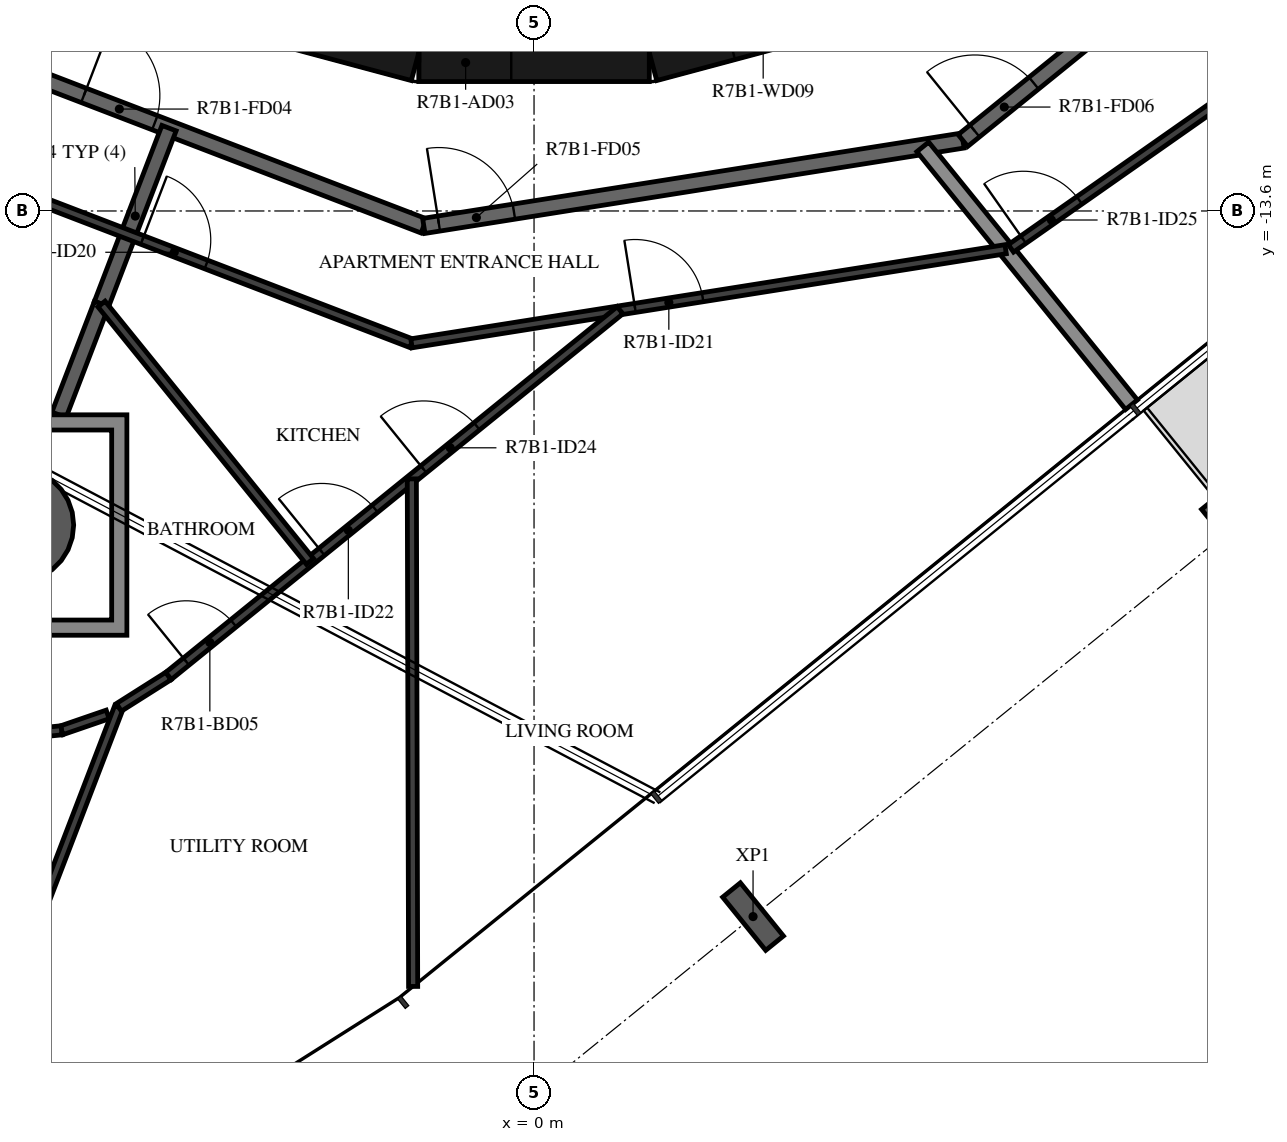
"""IFC4 building model, lengths in metres.
Left out: names, types, materials, properties, quantities, classifications, styles, units other than length and angle.
Written with IfcOpenShell. Run it as: python <this file> out.ifc"""

import sys

from ifc_helpers import new_model, si_unit, direction, frame, frame_2d, origin, origin_2d, place, context, subcontext, project, spatial, polyline, rectangle, hollow_circle, i_section, outline, extrude, element, fill, save


model = new_model("IFC4")
c1 = context("Model", 3, precision=1e-05, world=origin(), true_north=direction((0.0, 1.0)))
c2 = subcontext(c1, "Body", "Model", "MODEL_VIEW")
j1 = project(units=[si_unit("LENGTHUNIT", "METRE"), si_unit("PLANEANGLEUNIT", "RADIAN")], contexts=[c1])
p1 = place(None, origin())
s1 = spatial("IfcSite", under=j1, at=p1, CompositionType="ELEMENT")
p2 = place(p1, origin())
s2 = spatial("IfcBuilding", under=s1, at=p2, CompositionType="ELEMENT")
p3 = place(p2, frame((0.0, 0.0, 273.9)))
s3 = spatial("IfcBuildingStorey", under=s2, at=p3, CompositionType="ELEMENT", Elevation=273.9)
p4 = place(p3, frame((-6.807, -17.732, -0.38), z_axis=(0.0, 0.0, 1.0), x_axis=(1.0, 0.0, 0.0)))
e1 = element("IfcColumn", 1, at=p4, inside=s3, PredefinedType="COLUMN", context=c2, shape_type="SweptSolid", body=[
    extrude(hollow_circle(Radius=0.75, WallThickness=0.035, at=origin_2d()), origin(), (0.0, 0.0, 1.0), 3.5),
])
for number, where, z_axis, x_axis in (
    (2, (2.881, -22.883, -0.38), (0.0, 0.0, 1.0), (-0.777, -0.629, 0.0)),
    (3, (9.182, -17.781, -0.38), (0.0, 0.0, 1.0), (-0.777, -0.629, 0.0)),
):
    element("IfcColumn", number, at=place(p3, frame(where, z_axis=z_axis, x_axis=x_axis)), inside=s3, PredefinedType="COLUMN", context=c2, shape_type="SweptSolid", body=[
        extrude(i_section(OverallWidth=0.3, OverallDepth=0.9, WebThickness=0.019, FlangeThickness=0.035, FilletRadius=0.03, at=origin_2d()), origin(), (0.0, 0.0, 1.0), 3.5),
    ])
p5 = place(p3, frame((1.55, -11.643, 0.0), z_axis=(0.0, 0.0, 1.0), x_axis=(0.965948410781, 0.258734743916, 0.0)))
e4 = element("IfcWall", 4, at=p5, inside=s3, PredefinedType="SHEAR", context=c2, shape_type="SweptSolid", body=[
    extrude(rectangle(XDim=3.033, YDim=0.5, at=frame_2d((1.516, 0.0))), origin(), (0.0, 0.0, 1.0), 3.12),
])
p6 = place(p5, frame((1.066, 0.0, 0.0)))
e5 = element("IfcOpeningElement", 5, at=p6, cuts=e4, PredefinedType="OPENING", context=c2, shape_type="SweptSolid", body=[
    extrude(rectangle(XDim=0.9, YDim=2.1, at=frame_2d((0.45, 1.05))), frame((0.0, 0.26, 0.0), z_axis=(0.0, -1.0, 0.0), x_axis=(1.0, 0.0, 0.0)), (0.0, 0.0, 1.0), 0.52),
])
p7 = place(p3, frame((-4.479, -10.858, 0.0), z_axis=(0.0, 0.0, 1.0), x_axis=(0.965948410781, -0.258734743916, 0.0)))
e6 = element("IfcWall", 6, at=p7, inside=s3, PredefinedType="SHEAR", context=c2, shape_type="SweptSolid", body=[
    extrude(rectangle(XDim=3.033, YDim=0.5, at=frame_2d((1.516, 0.0))), origin(), (0.0, 0.0, 1.0), 3.12),
])
p8 = place(p3, frame((-1.516, -11.647, 0.0), z_axis=(0.0, 0.0, 1.0), x_axis=(1.0, 0.0, 0.0)))
e7 = element("IfcWall", 7, at=p8, inside=s3, PredefinedType="SHEAR", context=c2, shape_type="SweptSolid", body=[
    extrude(rectangle(XDim=3.033, YDim=0.5, at=frame_2d((1.516, 0.0))), origin(), (0.0, 0.0, 1.0), 3.12),
])
p9 = place(p8, frame((0.016, 0.0, 0.0)))
e8 = element("IfcOpeningElement", 8, at=p9, cuts=e7, PredefinedType="OPENING", context=c2, shape_type="SweptSolid", body=[
    extrude(rectangle(XDim=1.2, YDim=2.1, at=frame_2d((0.6, 1.05))), frame((0.0, 0.26, 0.0), z_axis=(0.0, -1.0, 0.0), x_axis=(1.0, 0.0, 0.0)), (0.0, 0.0, 1.0), 0.52),
])
p10 = place(p3, frame((-8.154, -11.223, 0.0), z_axis=(0.0, 0.0, 1.0), x_axis=(0.93359073609, -0.358341090983, 0.0)))
e9 = element("IfcWall", 9, at=p10, inside=s3, PredefinedType="STANDARD", context=c2, shape_type="SweptSolid", body=[
    extrude(rectangle(XDim=7.181, YDim=0.2, at=frame_2d((3.59, 0.0))), origin(), (0.0, 0.0, 1.0), 3.12),
])
p11 = place(p10, frame((2.39, 0.0, 0.0)))
e10 = element("IfcOpeningElement", 10, at=p11, cuts=e9, PredefinedType="OPENING", context=c2, shape_type="SweptSolid", body=[
    extrude(rectangle(XDim=1.0, YDim=2.1, at=frame_2d((0.5, 1.05))), frame((0.0, 0.11, 0.0), z_axis=(0.0, -1.0, 0.0), x_axis=(1.0, 0.0, 0.0)), (0.0, 0.0, 1.0), 0.22),
])
p12 = place(p3, frame((-1.45, -13.797, 0.0), z_axis=(0.0, 0.0, 1.0), x_axis=(0.987690361611, 0.156421704315, 0.0)))
e11 = element("IfcWall", 11, at=p12, inside=s3, PredefinedType="STANDARD", context=c2, shape_type="SweptSolid", body=[
    extrude(rectangle(XDim=7.181, YDim=0.2, at=frame_2d((3.591, 0.0))), origin(), (0.0, 0.0, 1.0), 3.12),
])
p13 = place(p12, frame((0.2, 0.0, 0.0)))
e12 = element("IfcOpeningElement", 12, at=p13, cuts=e11, PredefinedType="OPENING", context=c2, shape_type="SweptSolid", body=[
    extrude(rectangle(XDim=1.0, YDim=2.1, at=frame_2d((0.5, 1.05))), frame((0.0, 0.11, 0.0), z_axis=(0.0, -1.0, 0.0), x_axis=(1.0, 0.0, 0.0)), (0.0, 0.0, 1.0), 0.22),
])
p14 = place(p3, frame((5.643, -12.673, 0.0), z_axis=(0.0, 0.0, 1.0), x_axis=(0.777160148113, 0.629302871585, 0.0)))
e13 = element("IfcWall", 13, at=p14, inside=s3, PredefinedType="STANDARD", context=c2, shape_type="SweptSolid", body=[
    extrude(rectangle(XDim=7.181, YDim=0.2, at=frame_2d((3.59, 0.0))), origin(), (0.0, 0.0, 1.0), 3.12),
])
p15 = place(p14, frame((0.2, 0.0, 0.0)))
e14 = element("IfcOpeningElement", 14, at=p15, cuts=e13, PredefinedType="OPENING", context=c2, shape_type="SweptSolid", body=[
    extrude(rectangle(XDim=1.0, YDim=2.1, at=frame_2d((0.5, 1.05))), frame((0.0, 0.11, 0.0), z_axis=(0.0, -1.0, 0.0), x_axis=(1.0, 0.0, 0.0)), (0.0, 0.0, 1.0), 0.22),
])
p16 = place(p3, frame((-5.69, -14.824, 0.0), z_axis=(0.0, 0.0, 1.0), x_axis=(0.358345342952, 0.933589104041, 0.0)))
e15 = element("IfcWall", 15, at=p16, inside=s3, PredefinedType="STANDARD", context=c2, shape_type="SweptSolid", body=[
    extrude(rectangle(XDim=2.479, YDim=0.2, at=frame_2d((1.239, 0.0))), origin(), (0.0, 0.0, 1.0), 3.12),
])
p17 = place(p3, frame((-6.25, -16.282, 0.0), z_axis=(0.0, 0.0, 1.0), x_axis=(0.358360842469, 0.933583154617, 0.0)))
e16 = element("IfcWall", 16, at=p17, inside=s3, PredefinedType="STANDARD", context=c2, shape_type="SweptSolid", body=[
    extrude(rectangle(XDim=1.562, YDim=0.2, at=frame_2d((0.781, 0.0))), origin(), (0.0, 0.0, 1.0), 3.12),
])
p18 = place(p3, frame((7.861, -16.148, 0.0), z_axis=(0.0, 0.0, 1.0), x_axis=(-0.629330189513, 0.777138026716, 0.0)))
e17 = element("IfcWall", 17, at=p18, inside=s3, PredefinedType="STANDARD", context=c2, shape_type="SweptSolid", body=[
    extrude(rectangle(XDim=4.364, YDim=0.2, at=frame_2d((2.182, 0.0))), origin(), (0.0, 0.0, 1.0), 2.73),
])
p19 = place(p3, frame((-9.067, -12.479, 0.0), z_axis=(0.0, 0.0, 1.0), x_axis=(0.933579449035, -0.358370495911, 0.0)))
e18 = element("IfcWall", 18, at=p19, inside=s3, PredefinedType="PARTITIONING", context=c2, shape_type="SweptSolid", body=[
    extrude(rectangle(XDim=7.985, YDim=0.12, at=frame_2d((3.992, 0.0))), origin(), (0.0, 0.0, 1.0), 3.12),
])
p20 = place(p19, frame((4.192, 0.0, 0.0)))
e19 = element("IfcOpeningElement", 19, at=p20, cuts=e18, PredefinedType="OPENING", context=c2, shape_type="SweptSolid", body=[
    extrude(rectangle(XDim=0.9, YDim=2.1, at=frame_2d((0.45, 1.05))), frame((0.0, 0.07, 0.0), z_axis=(0.0, -1.0, 0.0), x_axis=(1.0, 0.0, 0.0)), (0.0, 0.0, 1.0), 0.14),
])
p21 = place(p3, frame((-1.612, -15.341, 0.0), z_axis=(0.0, 0.0, 1.0), x_axis=(0.987687560018, 0.15643939333, 0.0)))
e20 = element("IfcWall", 20, at=p21, inside=s3, PredefinedType="PARTITIONING", context=c2, shape_type="SweptSolid", body=[
    extrude(rectangle(XDim=7.914, YDim=0.12, at=frame_2d((3.957, 0.0))), origin(), (0.0, 0.0, 1.0), 3.12),
])
p22 = place(p21, frame((2.978, 0.0, 0.0)))
e21 = element("IfcOpeningElement", 21, at=p22, cuts=e20, PredefinedType="OPENING", context=c2, shape_type="SweptSolid", body=[
    extrude(rectangle(XDim=0.9, YDim=2.1, at=frame_2d((0.45, 1.05))), frame((0.0, 0.07, 0.0), z_axis=(0.0, -1.0, 0.0), x_axis=(1.0, 0.0, 0.0)), (0.0, 0.0, 1.0), 0.14),
])
p23 = place(p3, frame((-5.609, -20.223, 0.0), z_axis=(0.0, 0.0, 1.0), x_axis=(-0.945401267449, -0.325908642882, 0.0)))
e22 = element("IfcWall", 22, at=p23, inside=s3, PredefinedType="PARTITIONING", context=c2, shape_type="SweptSolid", body=[
    extrude(rectangle(XDim=0.642, YDim=0.12, at=frame_2d((0.321, 0.0))), origin(), (0.0, 0.0, 1.0), 3.12),
])
p24 = place(p3, frame((-6.216, -20.433, 0.0), z_axis=(0.0, 0.0, 1.0), x_axis=(-0.99513463391, -0.098524415207, 0.0)))
e23 = element("IfcWall", 23, at=p24, inside=s3, PredefinedType="PARTITIONING", context=c2, shape_type="SweptSolid", body=[
    extrude(rectangle(XDim=0.642, YDim=0.12, at=frame_2d((0.321, 0.0))), origin(), (0.0, 0.0, 1.0), 3.12),
])
p25 = place(p3, frame((-7.579, -25.646, 0.0), z_axis=(0.0, 0.0, 1.0), x_axis=(0.358336526264, 0.933592488158, 0.0)))
e24 = element("IfcWall", 24, at=p25, inside=s3, PredefinedType="PARTITIONING", context=c2, shape_type="SweptSolid", body=[
    extrude(rectangle(XDim=5.908, YDim=0.12, at=frame_2d((2.954, 0.0))), origin(), (0.0, 0.0, 1.0), 3.12),
])
p26 = place(p25, frame((0.2, 0.0, 0.0)))
e25 = element("IfcOpeningElement", 25, at=p26, cuts=e24, PredefinedType="OPENING", context=c2, shape_type="SweptSolid", body=[
    extrude(rectangle(XDim=0.9, YDim=2.1, at=frame_2d((0.45, 1.05))), frame((0.0, 0.07, 0.0), z_axis=(0.0, -1.0, 0.0), x_axis=(1.0, 0.0, 0.0)), (0.0, 0.0, 1.0), 0.14),
])
p27 = place(p3, frame((-5.462, -20.13, 0.0), z_axis=(0.0, 0.0, 1.0), x_axis=(0.84494764883, 0.534849016768, 0.0)))
e26 = element("IfcWall", 26, at=p27, inside=s3, PredefinedType="PARTITIONING", context=c2, shape_type="SweptSolid", body=[
    extrude(rectangle(XDim=0.772, YDim=0.12, at=frame_2d((0.386, 0.0))), origin(), (0.0, 0.0, 1.0), 3.12),
])
p28 = place(p3, frame((-4.809, -19.717, 0.0), z_axis=(0.0, 0.0, 1.0), x_axis=(0.777140730041, 0.629326851255, 0.0)))
e27 = element("IfcWall", 27, at=p28, inside=s3, PredefinedType="PARTITIONING", context=c2, shape_type="SweptSolid", body=[
    extrude(rectangle(XDim=7.644, YDim=0.12, at=frame_2d((3.822, 0.0))), origin(), (0.0, 0.0, 1.0), 3.12),
])
p29 = place(p28, frame((2.594, 0.0, 0.0)))
e28 = element("IfcOpeningElement", 28, at=p29, cuts=e27, PredefinedType="OPENING", context=c2, shape_type="SweptSolid", body=[
    extrude(rectangle(XDim=0.9, YDim=2.1, at=frame_2d((0.45, 1.05))), frame((0.0, 0.07, 0.0), z_axis=(0.0, -1.0, 0.0), x_axis=(1.0, 0.0, 0.0)), (0.0, 0.0, 1.0), 0.14),
])
p30 = place(p28, frame((0.3, 0.0, 0.0)))
e29 = element("IfcOpeningElement", 29, at=p30, cuts=e27, PredefinedType="OPENING", context=c2, shape_type="SweptSolid", body=[
    extrude(rectangle(XDim=0.8, YDim=2.1, at=frame_2d((0.4, 1.05))), frame((0.0, 0.07, 0.0), z_axis=(0.0, -1.0, 0.0), x_axis=(1.0, 0.0, 0.0)), (0.0, 0.0, 1.0), 0.14),
])
p31 = place(p28, frame((4.319, 0.0, 0.0)))
e30 = element("IfcOpeningElement", 30, at=p31, cuts=e27, PredefinedType="OPENING", context=c2, shape_type="SweptSolid", body=[
    extrude(rectangle(XDim=0.9, YDim=2.1, at=frame_2d((0.45, 1.05))), frame((0.0, 0.07, 0.0), z_axis=(0.0, -1.0, 0.0), x_axis=(1.0, 0.0, 0.0)), (0.0, 0.0, 1.0), 0.14),
])
p32 = place(p3, frame((-2.948, -18.21, 0.0), z_axis=(0.0, 0.0, 1.0), x_axis=(-0.629330389268, 0.777137864953, 0.0)))
e31 = element("IfcWall", 31, at=p32, inside=s3, PredefinedType="PARTITIONING", context=c2, shape_type="SweptSolid", body=[
    extrude(rectangle(XDim=4.357, YDim=0.12, at=frame_2d((2.179, 0.0))), origin(), (0.0, 0.0, 1.0), 3.12),
])
p33 = place(p3, frame((-1.591, -23.802, 0.0), z_axis=(0.0, 0.0, 1.0), x_axis=(-0.002595969315, 0.999996630466, 0.0)))
e32 = element("IfcWall", 32, at=p33, inside=s3, PredefinedType="PARTITIONING", context=c2, shape_type="SweptSolid", body=[
    extrude(rectangle(XDim=6.677, YDim=0.12, at=frame_2d((3.339, 0.0))), origin(), (0.0, 0.0, 1.0), 3.12),
])
p34 = place(p3, frame((6.274, -14.092, 0.0), z_axis=(0.0, 0.0, 1.0), x_axis=(0.818755256003, 0.574142691992, 0.0)))
e33 = element("IfcWall", 33, at=p34, inside=s3, PredefinedType="PARTITIONING", context=c2, shape_type="SweptSolid", body=[
    extrude(rectangle(XDim=5.08, YDim=0.12, at=frame_2d((2.54, 0.0))), origin(), (0.0, 0.0, 1.0), 3.12),
])
p35 = place(p34, frame((0.2, 0.0, 0.0)))
e34 = element("IfcOpeningElement", 34, at=p35, cuts=e33, PredefinedType="OPENING", context=c2, shape_type="SweptSolid", body=[
    extrude(rectangle(XDim=0.9, YDim=2.1, at=frame_2d((0.45, 1.05))), frame((0.0, 0.07, 0.0), z_axis=(0.0, -1.0, 0.0), x_axis=(1.0, 0.0, 0.0)), (0.0, 0.0, 1.0), 0.14),
])
p36 = place(p3, origin())
e35 = element("IfcWall", 35, at=p36, inside=s3, PredefinedType="STANDARD", context=c2, shape_type="SweptSolid", body=[
    extrude(outline(polyline([(-5.357, -16.282), (-5.357, -19.182), (-8.257, -19.182), (-8.257, -16.282), (-5.357, -16.282)]), holes=[polyline([(-8.057, -18.982), (-5.557, -18.982), (-5.557, -16.482), (-8.057, -16.482), (-8.057, -18.982)])]), origin(), (0.0, 0.0, 1.0), 3.12),
])
p37 = place(p9, origin())
e36 = element("IfcDoor", 36, at=p37, inside=s3, OperationType="SINGLE_SWING_RIGHT", PredefinedType="DOOR", context=c2, shape_type="SweptSolid", body=[
    extrude(rectangle(XDim=1.2, YDim=2.1, at=frame_2d((0.6, 1.05))), frame((0.0, 0.025, 0.0), z_axis=(0.0, -1.0, 0.0), x_axis=(1.0, 0.0, 0.0)), (0.0, 0.0, 1.0), 0.05),
])
fill(e8, e36)
p38 = place(p11, origin())
e37 = element("IfcDoor", 37, at=p38, inside=s3, OperationType="SINGLE_SWING_RIGHT", PredefinedType="DOOR", context=c2, shape_type="SweptSolid", body=[
    extrude(rectangle(XDim=1.0, YDim=2.1, at=frame_2d((0.5, 1.05))), frame((0.0, 0.025, 0.0), z_axis=(0.0, -1.0, 0.0), x_axis=(1.0, 0.0, 0.0)), (0.0, 0.0, 1.0), 0.05),
])
fill(e10, e37)
p39 = place(p13, origin())
e38 = element("IfcDoor", 38, at=p39, inside=s3, OperationType="SINGLE_SWING_LEFT", PredefinedType="DOOR", context=c2, shape_type="SweptSolid", body=[
    extrude(rectangle(XDim=1.0, YDim=2.1, at=frame_2d((0.5, 1.05))), frame((0.0, 0.025, 0.0), z_axis=(0.0, -1.0, 0.0), x_axis=(1.0, 0.0, 0.0)), (0.0, 0.0, 1.0), 0.05),
])
fill(e12, e38)
p40 = place(p20, origin())
e39 = element("IfcDoor", 39, at=p40, inside=s3, OperationType="SINGLE_SWING_RIGHT", PredefinedType="DOOR", context=c2, shape_type="SweptSolid", body=[
    extrude(rectangle(XDim=0.9, YDim=2.1, at=frame_2d((0.45, 1.05))), frame((0.0, 0.025, 0.0), z_axis=(0.0, -1.0, 0.0), x_axis=(1.0, 0.0, 0.0)), (0.0, 0.0, 1.0), 0.05),
])
fill(e19, e39)
p41 = place(p22, origin())
e40 = element("IfcDoor", 40, at=p41, inside=s3, OperationType="SINGLE_SWING_LEFT", PredefinedType="DOOR", context=c2, shape_type="SweptSolid", body=[
    extrude(rectangle(XDim=0.9, YDim=2.1, at=frame_2d((0.45, 1.05))), frame((0.0, 0.025, 0.0), z_axis=(0.0, -1.0, 0.0), x_axis=(1.0, 0.0, 0.0)), (0.0, 0.0, 1.0), 0.05),
])
fill(e21, e40)
p42 = place(p29, origin())
e41 = element("IfcDoor", 41, at=p42, inside=s3, OperationType="SINGLE_SWING_LEFT", PredefinedType="DOOR", context=c2, shape_type="SweptSolid", body=[
    extrude(rectangle(XDim=0.9, YDim=2.1, at=frame_2d((0.45, 1.05))), frame((0.0, 0.025, 0.0), z_axis=(0.0, -1.0, 0.0), x_axis=(1.0, 0.0, 0.0)), (0.0, 0.0, 1.0), 0.05),
])
fill(e28, e41)
p43 = place(p30, origin())
e42 = element("IfcDoor", 42, at=p43, inside=s3, OperationType="SINGLE_SWING_RIGHT", PredefinedType="DOOR", context=c2, shape_type="SweptSolid", body=[
    extrude(rectangle(XDim=0.8, YDim=2.1, at=frame_2d((0.4, 1.05))), frame((0.0, 0.025, 0.0), z_axis=(0.0, -1.0, 0.0), x_axis=(1.0, 0.0, 0.0)), (0.0, 0.0, 1.0), 0.05),
])
fill(e29, e42)
p44 = place(p31, origin())
e43 = element("IfcDoor", 43, at=p44, inside=s3, OperationType="SINGLE_SWING_RIGHT", PredefinedType="DOOR", context=c2, shape_type="SweptSolid", body=[
    extrude(rectangle(XDim=0.9, YDim=2.1, at=frame_2d((0.45, 1.05))), frame((0.0, 0.025, 0.0), z_axis=(0.0, -1.0, 0.0), x_axis=(1.0, 0.0, 0.0)), (0.0, 0.0, 1.0), 0.05),
])
fill(e30, e43)
p45 = place(p15, origin())
e44 = element("IfcDoor", 44, at=p45, inside=s3, OperationType="SINGLE_SWING_LEFT", PredefinedType="DOOR", context=c2, shape_type="SweptSolid", body=[
    extrude(rectangle(XDim=1.0, YDim=2.1, at=frame_2d((0.5, 1.05))), frame((0.0, 0.025, 0.0), z_axis=(0.0, -1.0, 0.0), x_axis=(1.0, 0.0, 0.0)), (0.0, 0.0, 1.0), 0.05),
])
fill(e14, e44)
p46 = place(p35, origin())
e45 = element("IfcDoor", 45, at=p46, inside=s3, OperationType="SINGLE_SWING_LEFT", PredefinedType="DOOR", context=c2, shape_type="SweptSolid", body=[
    extrude(rectangle(XDim=0.9, YDim=2.1, at=frame_2d((0.45, 1.05))), frame((0.0, 0.025, 0.0), z_axis=(0.0, -1.0, 0.0), x_axis=(1.0, 0.0, 0.0)), (0.0, 0.0, 1.0), 0.05),
])
fill(e34, e45)
save(model, sys.argv[1])
